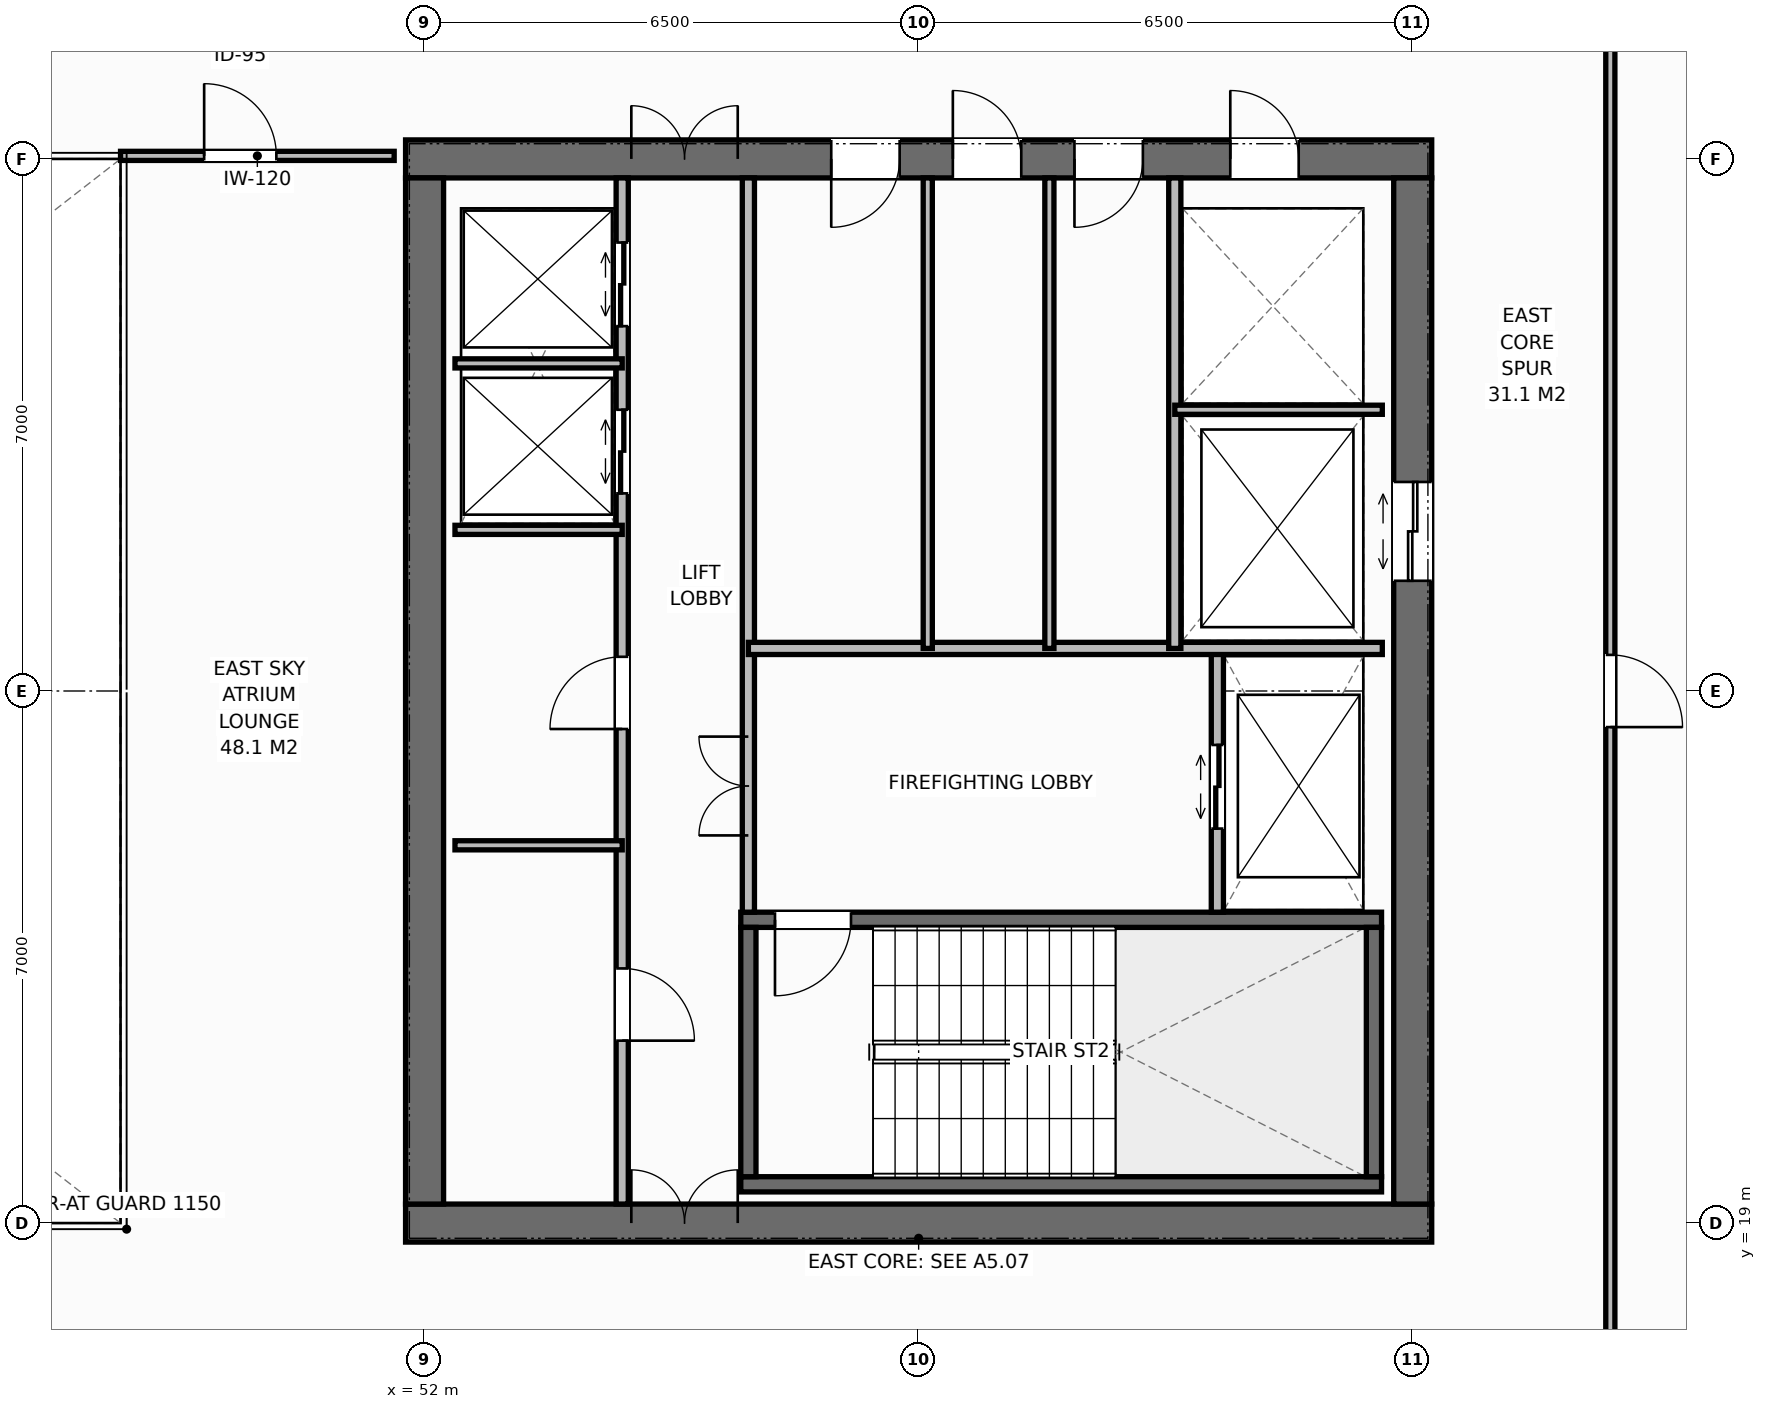
"""IFC4 building model, lengths in metres.
Left out: names, types, materials, properties, quantities, classifications, styles, units other than length and angle.
Written with IfcOpenShell. Run it as: python <this file> out.ifc"""

import sys

from ifc_helpers import new_model, si_unit, direction, frame, frame_2d, origin, place, context, subcontext, project, spatial, rectangle, extrude, element, fill, save


model = new_model("IFC4")
c1 = context("Model", 3, precision=1e-05, world=origin(), true_north=direction((0.0, 1.0)))
c2 = subcontext(c1, "Body", "Model", "MODEL_VIEW")
j1 = project(units=[si_unit("LENGTHUNIT", "METRE"), si_unit("PLANEANGLEUNIT", "RADIAN")], contexts=[c1])
p1 = place(None, origin())
s1 = spatial("IfcSite", under=j1, at=p1, CompositionType="ELEMENT")
p2 = place(p1, origin())
s2 = spatial("IfcBuilding", under=s1, at=p2, CompositionType="ELEMENT")
p3 = place(p2, frame((0.0, 0.0, 286.4)))
s3 = spatial("IfcBuildingStorey", under=s2, at=p3, CompositionType="ELEMENT", Elevation=286.4)
p4 = place(p3, frame((51.75, 19.0, 0.0), z_axis=(0.0, 0.0, 1.0), x_axis=(1.0, 0.0, 0.0)))
e1 = element("IfcWall", 1, at=p4, inside=s3, PredefinedType="SHEAR", context=c2, shape_type="SweptSolid", body=[
    extrude(rectangle(XDim=13.5, YDim=0.5, at=frame_2d((6.75, 0.0))), origin(), (0.0, 0.0, 1.0), 4.0),
])
p5 = place(p4, frame((2.97, 0.0, 0.0)))
e2 = element("IfcOpeningElement", 2, at=p5, cuts=e1, PredefinedType="OPENING", context=c2, shape_type="SweptSolid", body=[
    extrude(rectangle(XDim=1.4, YDim=2.2, at=frame_2d((0.7, 1.1))), frame((0.0, 0.26, 0.0), z_axis=(0.0, -1.0, 0.0), x_axis=(1.0, 0.0, 0.0)), (0.0, 0.0, 1.0), 0.52),
])
p6 = place(p3, frame((51.75, 33.0, 0.0), z_axis=(0.0, 0.0, 1.0), x_axis=(1.0, 0.0, 0.0)))
e3 = element("IfcWall", 3, at=p6, inside=s3, PredefinedType="SHEAR", context=c2, shape_type="SweptSolid", body=[
    extrude(rectangle(XDim=13.5, YDim=0.5, at=frame_2d((6.75, 0.0))), origin(), (0.0, 0.0, 1.0), 4.0),
])
p7 = place(p6, frame((2.97, 0.0, 0.0)))
e4 = element("IfcOpeningElement", 4, at=p7, cuts=e3, PredefinedType="OPENING", context=c2, shape_type="SweptSolid", body=[
    extrude(rectangle(XDim=1.4, YDim=2.2, at=frame_2d((0.7, 1.1))), frame((0.0, 0.26, 0.0), z_axis=(0.0, -1.0, 0.0), x_axis=(1.0, 0.0, 0.0)), (0.0, 0.0, 1.0), 0.52),
])
p8 = place(p6, frame((10.85, 0.0, 0.0)))
e5 = element("IfcOpeningElement", 5, at=p8, cuts=e3, PredefinedType="OPENING", context=c2, shape_type="SweptSolid", body=[
    extrude(rectangle(XDim=0.9, YDim=2.15, at=frame_2d((0.45, 1.075))), frame((0.0, 0.26, 0.0), z_axis=(0.0, -1.0, 0.0), x_axis=(1.0, 0.0, 0.0)), (0.0, 0.0, 1.0), 0.52),
])
p9 = place(p6, frame((5.6, 0.0, 0.0)))
e6 = element("IfcOpeningElement", 6, at=p9, cuts=e3, PredefinedType="OPENING", context=c2, shape_type="SweptSolid", body=[
    extrude(rectangle(XDim=0.9, YDim=2.15, at=frame_2d((0.45, 1.075))), frame((0.0, 0.26, 0.0), z_axis=(0.0, -1.0, 0.0), x_axis=(1.0, 0.0, 0.0)), (0.0, 0.0, 1.0), 0.52),
])
p10 = place(p6, frame((7.2, 0.0, 0.0)))
e7 = element("IfcOpeningElement", 7, at=p10, cuts=e3, PredefinedType="OPENING", context=c2, shape_type="SweptSolid", body=[
    extrude(rectangle(XDim=0.9, YDim=2.15, at=frame_2d((0.45, 1.075))), frame((0.0, 0.26, 0.0), z_axis=(0.0, -1.0, 0.0), x_axis=(1.0, 0.0, 0.0)), (0.0, 0.0, 1.0), 0.52),
])
p11 = place(p6, frame((8.8, 0.0, 0.0)))
e8 = element("IfcOpeningElement", 8, at=p11, cuts=e3, PredefinedType="OPENING", context=c2, shape_type="SweptSolid", body=[
    extrude(rectangle(XDim=0.9, YDim=2.15, at=frame_2d((0.45, 1.075))), frame((0.0, 0.26, 0.0), z_axis=(0.0, -1.0, 0.0), x_axis=(1.0, 0.0, 0.0)), (0.0, 0.0, 1.0), 0.52),
])
p12 = place(p3, frame((52.0, 19.25, 0.0), z_axis=(0.0, 0.0, 1.0), x_axis=(0.0, 1.0, 0.0)))
e9 = element("IfcWall", 9, at=p12, inside=s3, PredefinedType="SHEAR", context=c2, shape_type="SweptSolid", body=[
    extrude(rectangle(XDim=13.5, YDim=0.5, at=frame_2d((6.75, 0.0))), origin(), (0.0, 0.0, 1.0), 4.0),
])
p13 = place(p3, frame((65.0, 19.25, 0.0), z_axis=(0.0, 0.0, 1.0), x_axis=(0.0, 1.0, 0.0)))
e10 = element("IfcWall", 10, at=p13, inside=s3, PredefinedType="SHEAR", context=c2, shape_type="SweptSolid", body=[
    extrude(rectangle(XDim=13.5, YDim=0.5, at=frame_2d((6.75, 0.0))), origin(), (0.0, 0.0, 1.0), 4.0),
])
p14 = place(p13, frame((8.2, 0.0, 0.0)))
e11 = element("IfcOpeningElement", 11, at=p14, cuts=e10, PredefinedType="OPENING", context=c2, shape_type="SweptSolid", body=[
    extrude(rectangle(XDim=1.3, YDim=2.2, at=frame_2d((0.65, 1.1))), frame((0.0, 0.26, 0.0), z_axis=(0.0, -1.0, 0.0), x_axis=(1.0, 0.0, 0.0)), (0.0, 0.0, 1.0), 0.52),
])
p15 = place(p3, frame((56.16, 19.51, 0.0), z_axis=(0.0, 0.0, 1.0), x_axis=(1.0, 0.0, 0.0)))
e12 = element("IfcWall", 12, at=p15, inside=s3, PredefinedType="SHEAR", context=c2, shape_type="SweptSolid", body=[
    extrude(rectangle(XDim=8.43, YDim=0.2, at=frame_2d((4.215, 0.0))), origin(), (0.0, 0.0, 1.0), 4.0),
])
p16 = place(p3, frame((56.16, 22.99, 0.0), z_axis=(0.0, 0.0, 1.0), x_axis=(1.0, 0.0, 0.0)))
e13 = element("IfcWall", 13, at=p16, inside=s3, PredefinedType="SHEAR", context=c2, shape_type="SweptSolid", body=[
    extrude(rectangle(XDim=8.43, YDim=0.2, at=frame_2d((4.215, 0.0))), origin(), (0.0, 0.0, 1.0), 4.0),
])
p17 = place(p16, frame((0.45, 0.0, 0.0)))
e14 = element("IfcOpeningElement", 14, at=p17, cuts=e13, PredefinedType="OPENING", context=c2, shape_type="SweptSolid", body=[
    extrude(rectangle(XDim=1.0, YDim=2.15, at=frame_2d((0.5, 1.075))), frame((0.0, 0.11, 0.0), z_axis=(0.0, -1.0, 0.0), x_axis=(1.0, 0.0, 0.0)), (0.0, 0.0, 1.0), 0.22),
])
for number, where, z_axis, x_axis in (
    (15, (56.26, 19.61, 0.0), (0.0, 0.0, 1.0), (0.0, 1.0, 0.0)),
    (16, (64.49, 19.61, 0.0), (0.0, 0.0, 1.0), (0.0, 1.0, 0.0)),
):
    element("IfcWall", number, at=place(p3, frame(where, z_axis=z_axis, x_axis=x_axis)), inside=s3, PredefinedType="SHEAR", context=c2, shape_type="SweptSolid", body=[
        extrude(rectangle(XDim=3.28, YDim=0.2, at=frame_2d((1.64, 0.0))), origin(), (0.0, 0.0, 1.0), 4.0),
    ])
p18 = place(p3, frame((54.6, 19.25, 0.0), z_axis=(0.0, 0.0, 1.0), x_axis=(0.0, 1.0, 0.0)))
e17 = element("IfcWall", 17, at=p18, inside=s3, PredefinedType="STANDARD", context=c2, shape_type="SweptSolid", body=[
    extrude(rectangle(XDim=13.5, YDim=0.16, at=frame_2d((6.75, 0.0))), origin(), (0.0, 0.0, 1.0), 3.788),
])
p19 = place(p18, frame((2.15, 0.0, 0.0)))
e18 = element("IfcOpeningElement", 18, at=p19, cuts=e17, PredefinedType="OPENING", context=c2, shape_type="SweptSolid", body=[
    extrude(rectangle(XDim=0.95, YDim=2.15, at=frame_2d((0.475, 1.075))), frame((0.0, 0.09, 0.0), z_axis=(0.0, -1.0, 0.0), x_axis=(1.0, 0.0, 0.0)), (0.0, 0.0, 1.0), 0.18),
])
p20 = place(p18, frame((6.25, 0.0, 0.0)))
e19 = element("IfcOpeningElement", 19, at=p20, cuts=e17, PredefinedType="OPENING", context=c2, shape_type="SweptSolid", body=[
    extrude(rectangle(XDim=0.95, YDim=2.15, at=frame_2d((0.475, 1.075))), frame((0.0, 0.09, 0.0), z_axis=(0.0, -1.0, 0.0), x_axis=(1.0, 0.0, 0.0)), (0.0, 0.0, 1.0), 0.18),
])
p21 = place(p18, frame((9.35, 0.0, 0.0)))
e20 = element("IfcOpeningElement", 20, at=p21, cuts=e17, PredefinedType="OPENING", context=c2, shape_type="SweptSolid", body=[
    extrude(rectangle(XDim=1.1, YDim=2.2, at=frame_2d((0.55, 1.1))), frame((0.0, 0.09, 0.0), z_axis=(0.0, -1.0, 0.0), x_axis=(1.0, 0.0, 0.0)), (0.0, 0.0, 1.0), 0.18),
])
p22 = place(p18, frame((11.55, 0.0, 0.0)))
e21 = element("IfcOpeningElement", 21, at=p22, cuts=e17, PredefinedType="OPENING", context=c2, shape_type="SweptSolid", body=[
    extrude(rectangle(XDim=1.1, YDim=2.2, at=frame_2d((0.55, 1.1))), frame((0.0, 0.09, 0.0), z_axis=(0.0, -1.0, 0.0), x_axis=(1.0, 0.0, 0.0)), (0.0, 0.0, 1.0), 0.18),
])
p23 = place(p3, frame((56.26, 23.09, 0.0), z_axis=(0.0, 0.0, 1.0), x_axis=(0.0, 1.0, 0.0)))
e22 = element("IfcWall", 22, at=p23, inside=s3, PredefinedType="STANDARD", context=c2, shape_type="SweptSolid", body=[
    extrude(rectangle(XDim=9.66, YDim=0.16, at=frame_2d((4.83, 0.0))), origin(), (0.0, 0.0, 1.0), 3.788),
])
p24 = place(p23, frame((1.01, 0.0, 0.0)))
e23 = element("IfcOpeningElement", 23, at=p24, cuts=e22, PredefinedType="OPENING", context=c2, shape_type="SweptSolid", body=[
    extrude(rectangle(XDim=1.3, YDim=2.2, at=frame_2d((0.65, 1.1))), frame((0.0, 0.09, 0.0), z_axis=(0.0, -1.0, 0.0), x_axis=(1.0, 0.0, 0.0)), (0.0, 0.0, 1.0), 0.18),
])
for number, where, z_axis, x_axis in (
    (24, (52.4, 23.97, 0.0), (0.0, 0.0, 1.0), (1.0, 0.0, 0.0)),
    (25, (52.4, 28.12, 0.0), (0.0, 0.0, 1.0), (1.0, 0.0, 0.0)),
    (26, (52.4, 30.31, 0.0), (0.0, 0.0, 1.0), (1.0, 0.0, 0.0)),
):
    element("IfcWall", number, at=place(p3, frame(where, z_axis=z_axis, x_axis=x_axis)), inside=s3, PredefinedType="PARTITIONING", context=c2, shape_type="SweptSolid", body=[
        extrude(rectangle(XDim=2.2, YDim=0.12, at=frame_2d((1.1, 0.0))), origin(), (0.0, 0.0, 1.0), 3.788),
    ])
p25 = place(p3, frame((62.43, 23.09, 0.0), z_axis=(0.0, 0.0, 1.0), x_axis=(0.0, 1.0, 0.0)))
e27 = element("IfcWall", 27, at=p25, inside=s3, PredefinedType="STANDARD", context=c2, shape_type="SweptSolid", body=[
    extrude(rectangle(XDim=3.47, YDim=0.16, at=frame_2d((1.735, 0.0))), origin(), (0.0, 0.0, 1.0), 3.788),
])
p26 = place(p25, frame((1.1, 0.0, 0.0)))
e28 = element("IfcOpeningElement", 28, at=p26, cuts=e27, PredefinedType="OPENING", context=c2, shape_type="SweptSolid", body=[
    extrude(rectangle(XDim=1.1, YDim=2.2, at=frame_2d((0.55, 1.1))), frame((0.0, 0.09, 0.0), z_axis=(0.0, -1.0, 0.0), x_axis=(1.0, 0.0, 0.0)), (0.0, 0.0, 1.0), 0.18),
])
p27 = place(p3, frame((56.26, 26.56, 0.0), z_axis=(0.0, 0.0, 1.0), x_axis=(1.0, 0.0, 0.0)))
e29 = element("IfcWall", 29, at=p27, inside=s3, PredefinedType="STANDARD", context=c2, shape_type="SweptSolid", body=[
    extrude(rectangle(XDim=8.34, YDim=0.16, at=frame_2d((4.17, 0.0))), origin(), (0.0, 0.0, 1.0), 3.788),
])
p28 = place(p3, frame((61.87, 26.56, 0.0), z_axis=(0.0, 0.0, 1.0), x_axis=(0.0, 1.0, 0.0)))
e30 = element("IfcWall", 30, at=p28, inside=s3, PredefinedType="STANDARD", context=c2, shape_type="SweptSolid", body=[
    extrude(rectangle(XDim=6.19, YDim=0.16, at=frame_2d((3.095, 0.0))), origin(), (0.0, 0.0, 1.0), 3.788),
])
p29 = place(p3, frame((61.87, 29.7, 0.0), z_axis=(0.0, 0.0, 1.0), x_axis=(1.0, 0.0, 0.0)))
e31 = element("IfcWall", 31, at=p29, inside=s3, PredefinedType="PARTITIONING", context=c2, shape_type="SweptSolid", body=[
    extrude(rectangle(XDim=2.73, YDim=0.12, at=frame_2d((1.365, 0.0))), origin(), (0.0, 0.0, 1.0), 3.788),
])
for number, where, z_axis, x_axis in (
    (32, (58.62, 26.56, 0.0), (0.0, 0.0, 1.0), (0.0, 1.0, 0.0)),
    (33, (60.22, 26.56, 0.0), (0.0, 0.0, 1.0), (0.0, 1.0, 0.0)),
):
    element("IfcWall", number, at=place(p3, frame(where, z_axis=z_axis, x_axis=x_axis)), inside=s3, PredefinedType="PARTITIONING", context=c2, shape_type="SweptSolid", body=[
        extrude(rectangle(XDim=6.19, YDim=0.12, at=frame_2d((3.095, 0.0))), origin(), (0.0, 0.0, 1.0), 3.788),
    ])
p30 = place(p3, frame((48.0, 33.04, 0.0), z_axis=(0.0, 0.0, 1.0), x_axis=(1.0, 0.0, 0.0)))
e34 = element("IfcWall", 34, at=p30, inside=s3, PredefinedType="PARTITIONING", context=c2, shape_type="SweptSolid", body=[
    extrude(rectangle(XDim=3.6, YDim=0.12, at=frame_2d((1.8, 0.0))), origin(), (0.0, 0.0, 1.0), 3.528),
])
p31 = place(p30, frame((1.1, 0.0, 0.0)))
e35 = element("IfcOpeningElement", 35, at=p31, cuts=e34, PredefinedType="OPENING", context=c2, shape_type="SweptSolid", body=[
    extrude(rectangle(XDim=0.95, YDim=2.15, at=frame_2d((0.475, 1.075))), frame((0.0, 0.07, 0.0), z_axis=(0.0, -1.0, 0.0), x_axis=(1.0, 0.0, 0.0)), (0.0, 0.0, 1.0), 0.14),
])
p32 = place(p3, frame((67.6, 16.5, 0.0), z_axis=(0.0, 0.0, 1.0), x_axis=(0.0, 1.0, 0.0)))
e36 = element("IfcWall", 36, at=p32, inside=s3, PredefinedType="PARTITIONING", context=c2, shape_type="SweptSolid", body=[
    extrude(rectangle(XDim=19.0, YDim=0.12, at=frame_2d((9.5, 0.0))), origin(), (0.0, 0.0, 1.0), 3.788),
])
p33 = place(p32, frame((9.025, 0.0, 0.0)))
e37 = element("IfcOpeningElement", 37, at=p33, cuts=e36, PredefinedType="OPENING", context=c2, shape_type="SweptSolid", body=[
    extrude(rectangle(XDim=0.95, YDim=2.15, at=frame_2d((0.475, 1.075))), frame((0.0, 0.07, 0.0), z_axis=(0.0, -1.0, 0.0), x_axis=(1.0, 0.0, 0.0)), (0.0, 0.0, 1.0), 0.14),
])
p34 = place(p5, origin())
e38 = element("IfcDoor", 38, at=p34, inside=s3, OperationType="DOUBLE_DOOR_SINGLE_SWING", PredefinedType="DOOR", context=c2, shape_type="SweptSolid", body=[
    extrude(rectangle(XDim=1.4, YDim=2.2, at=frame_2d((0.7, 1.1))), frame((0.0, 0.075, 0.0), z_axis=(0.0, -1.0, 0.0), x_axis=(1.0, 0.0, 0.0)), (0.0, 0.0, 1.0), 0.05),
])
fill(e2, e38)
p35 = place(p7, origin())
e39 = element("IfcDoor", 39, at=p35, inside=s3, OperationType="DOUBLE_DOOR_SINGLE_SWING", PredefinedType="DOOR", context=c2, shape_type="SweptSolid", body=[
    extrude(rectangle(XDim=1.4, YDim=2.2, at=frame_2d((0.7, 1.1))), frame((0.0, -0.025, 0.0), z_axis=(0.0, -1.0, 0.0), x_axis=(1.0, 0.0, 0.0)), (0.0, 0.0, 1.0), 0.05),
])
fill(e4, e39)
p36 = place(p19, origin())
e40 = element("IfcDoor", 40, at=p36, inside=s3, OperationType="SINGLE_SWING_RIGHT", PredefinedType="DOOR", context=c2, shape_type="SweptSolid", body=[
    extrude(rectangle(XDim=0.95, YDim=2.15, at=frame_2d((0.475, 1.075))), frame((0.0, 0.025, 0.0), z_axis=(0.0, -1.0, 0.0), x_axis=(1.0, 0.0, 0.0)), (0.0, 0.0, 1.0), 0.05),
])
fill(e18, e40)
p37 = place(p20, origin())
e41 = element("IfcDoor", 41, at=p37, inside=s3, OperationType="SINGLE_SWING_LEFT", PredefinedType="DOOR", context=c2, shape_type="SweptSolid", body=[
    extrude(rectangle(XDim=0.95, YDim=2.15, at=frame_2d((0.475, 1.075))), frame((0.0, 0.025, 0.0), z_axis=(0.0, -1.0, 0.0), x_axis=(1.0, 0.0, 0.0)), (0.0, 0.0, 1.0), 0.05),
])
fill(e19, e41)
p38 = place(p21, origin())
e42 = element("IfcDoor", 42, at=p38, inside=s3, OperationType="DOUBLE_DOOR_SLIDING", PredefinedType="DOOR", context=c2, shape_type="SweptSolid", body=[
    extrude(rectangle(XDim=1.1, YDim=2.2, at=frame_2d((0.55, 1.1))), frame((0.0, 0.025, 0.0), z_axis=(0.0, -1.0, 0.0), x_axis=(1.0, 0.0, 0.0)), (0.0, 0.0, 1.0), 0.05),
])
fill(e20, e42)
p39 = place(p22, origin())
e43 = element("IfcDoor", 43, at=p39, inside=s3, OperationType="DOUBLE_DOOR_SLIDING", PredefinedType="DOOR", context=c2, shape_type="SweptSolid", body=[
    extrude(rectangle(XDim=1.1, YDim=2.2, at=frame_2d((0.55, 1.1))), frame((0.0, 0.025, 0.0), z_axis=(0.0, -1.0, 0.0), x_axis=(1.0, 0.0, 0.0)), (0.0, 0.0, 1.0), 0.05),
])
fill(e21, e43)
p40 = place(p17, origin())
e44 = element("IfcDoor", 44, at=p40, inside=s3, OperationType="SINGLE_SWING_RIGHT", PredefinedType="DOOR", context=c2, shape_type="SweptSolid", body=[
    extrude(rectangle(XDim=1.0, YDim=2.15, at=frame_2d((0.5, 1.075))), frame((0.0, 0.025, 0.0), z_axis=(0.0, -1.0, 0.0), x_axis=(1.0, 0.0, 0.0)), (0.0, 0.0, 1.0), 0.05),
])
fill(e14, e44)
p41 = place(p26, origin())
e45 = element("IfcDoor", 45, at=p41, inside=s3, OperationType="DOUBLE_DOOR_SLIDING", PredefinedType="DOOR", context=c2, shape_type="SweptSolid", body=[
    extrude(rectangle(XDim=1.1, YDim=2.2, at=frame_2d((0.55, 1.1))), frame((0.0, 0.025, 0.0), z_axis=(0.0, -1.0, 0.0), x_axis=(1.0, 0.0, 0.0)), (0.0, 0.0, 1.0), 0.05),
])
fill(e28, e45)
p42 = place(p24, origin())
e46 = element("IfcDoor", 46, at=p42, inside=s3, OperationType="DOUBLE_DOOR_SINGLE_SWING", PredefinedType="DOOR", context=c2, shape_type="SweptSolid", body=[
    extrude(rectangle(XDim=1.3, YDim=2.2, at=frame_2d((0.65, 1.1))), frame((0.0, 0.025, 0.0), z_axis=(0.0, -1.0, 0.0), x_axis=(1.0, 0.0, 0.0)), (0.0, 0.0, 1.0), 0.05),
])
fill(e23, e46)
p43 = place(p14, origin())
e47 = element("IfcDoor", 47, at=p43, inside=s3, OperationType="DOUBLE_DOOR_SLIDING", PredefinedType="DOOR", context=c2, shape_type="SweptSolid", body=[
    extrude(rectangle(XDim=1.3, YDim=2.2, at=frame_2d((0.65, 1.1))), frame((0.0, 0.025, 0.0), z_axis=(0.0, -1.0, 0.0), x_axis=(1.0, 0.0, 0.0)), (0.0, 0.0, 1.0), 0.05),
])
fill(e11, e47)
p44 = place(p8, origin())
e48 = element("IfcDoor", 48, at=p44, inside=s3, OperationType="SINGLE_SWING_LEFT", PredefinedType="DOOR", context=c2, shape_type="SweptSolid", body=[
    extrude(rectangle(XDim=0.9, YDim=2.15, at=frame_2d((0.45, 1.075))), frame((0.0, -0.025, 0.0), z_axis=(0.0, -1.0, 0.0), x_axis=(1.0, 0.0, 0.0)), (0.0, 0.0, 1.0), 0.05),
])
fill(e5, e48)
p45 = place(p9, origin())
e49 = element("IfcDoor", 49, at=p45, inside=s3, OperationType="SINGLE_SWING_RIGHT", PredefinedType="DOOR", context=c2, shape_type="SweptSolid", body=[
    extrude(rectangle(XDim=0.9, YDim=2.15, at=frame_2d((0.45, 1.075))), frame((0.0, -0.025, 0.0), z_axis=(0.0, -1.0, 0.0), x_axis=(1.0, 0.0, 0.0)), (0.0, 0.0, 1.0), 0.05),
])
fill(e6, e49)
p46 = place(p10, origin())
e50 = element("IfcDoor", 50, at=p46, inside=s3, OperationType="SINGLE_SWING_LEFT", PredefinedType="DOOR", context=c2, shape_type="SweptSolid", body=[
    extrude(rectangle(XDim=0.9, YDim=2.15, at=frame_2d((0.45, 1.075))), frame((0.0, -0.025, 0.0), z_axis=(0.0, -1.0, 0.0), x_axis=(1.0, 0.0, 0.0)), (0.0, 0.0, 1.0), 0.05),
])
fill(e7, e50)
p47 = place(p11, origin())
e51 = element("IfcDoor", 51, at=p47, inside=s3, OperationType="SINGLE_SWING_RIGHT", PredefinedType="DOOR", context=c2, shape_type="SweptSolid", body=[
    extrude(rectangle(XDim=0.9, YDim=2.15, at=frame_2d((0.45, 1.075))), frame((0.0, -0.025, 0.0), z_axis=(0.0, -1.0, 0.0), x_axis=(1.0, 0.0, 0.0)), (0.0, 0.0, 1.0), 0.05),
])
fill(e8, e51)
p48 = place(p31, origin())
e52 = element("IfcDoor", 52, at=p48, inside=s3, OperationType="SINGLE_SWING_LEFT", PredefinedType="DOOR", context=c2, shape_type="SweptSolid", body=[
    extrude(rectangle(XDim=0.95, YDim=2.15, at=frame_2d((0.475, 1.075))), frame((0.0, 0.025, 0.0), z_axis=(0.0, -1.0, 0.0), x_axis=(1.0, 0.0, 0.0)), (0.0, 0.0, 1.0), 0.05),
])
fill(e35, e52)
p49 = place(p33, origin())
e53 = element("IfcDoor", 53, at=p49, inside=s3, OperationType="SINGLE_SWING_RIGHT", PredefinedType="DOOR", context=c2, shape_type="SweptSolid", body=[
    extrude(rectangle(XDim=0.95, YDim=2.15, at=frame_2d((0.475, 1.075))), frame((0.0, 0.025, 0.0), z_axis=(0.0, -1.0, 0.0), x_axis=(1.0, 0.0, 0.0)), (0.0, 0.0, 1.0), 0.05),
])
fill(e37, e53)
save(model, sys.argv[1])
